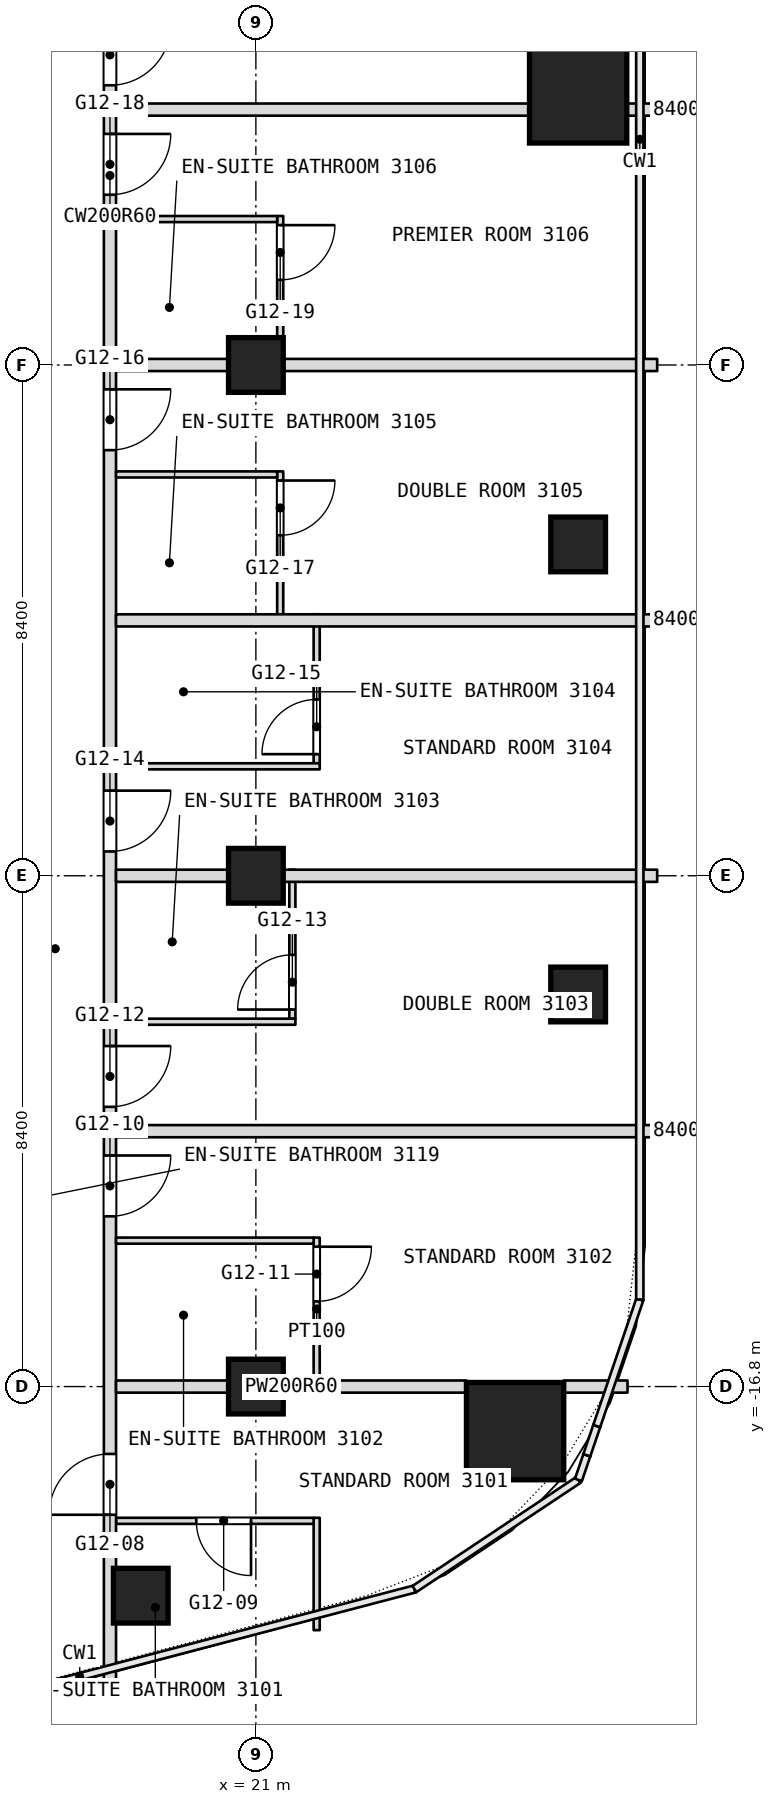
"""IFC4 building model, lengths in metres.
Left out: names, types, materials, properties, quantities, classifications, styles, units other than length and angle.
Written with IfcOpenShell. Run it as: python <this file> out.ifc"""

import sys

from ifc_helpers import new_model, si_unit, direction, frame, frame_2d, origin, origin_2d, place, context, subcontext, project, spatial, rectangle, extrude, element, fill, save


model = new_model("IFC4")
c1 = context("Model", 3, precision=1e-05, world=origin(), true_north=direction((0.0, 1.0)))
c2 = subcontext(c1, "Body", "Model", "MODEL_VIEW")
j1 = project(units=[si_unit("LENGTHUNIT", "METRE"), si_unit("PLANEANGLEUNIT", "RADIAN")], contexts=[c1])
p1 = place(None, origin())
s1 = spatial("IfcSite", under=j1, at=p1, CompositionType="ELEMENT")
p2 = place(p1, origin())
s2 = spatial("IfcBuilding", under=s1, at=p2, CompositionType="ELEMENT")
p3 = place(p2, frame((0.0, 0.0, 137.3)))
s3 = spatial("IfcBuildingStorey", under=s2, at=p3, CompositionType="ELEMENT", Elevation=137.3)
for number, where, z_axis, x_axis in (
    (1, (25.263, -17.533, 0.0), (0.0, 0.0, 1.0), (1.0, 0.0, 0.0)),
    (2, (26.3, 4.45, 0.0), (0.0, 0.0, 1.0), (1.0, 0.0, 0.0)),
):
    element("IfcColumn", number, at=place(p3, frame(where, z_axis=z_axis, x_axis=x_axis)), inside=s3, PredefinedType="COLUMN", context=c2, shape_type="SweptSolid", body=[
        extrude(rectangle(XDim=1.6, YDim=1.6, at=origin_2d()), origin(), (0.0, 0.0, 1.0), 3.6),
    ])
for number, where, z_axis, x_axis in (
    (3, (21.0, -16.8, 0.0), (0.0, 0.0, 1.0), (1.0, 0.0, 0.0)),
    (4, (21.0, -8.4, 0.0), (0.0, 0.0, 1.0), (1.0, 0.0, 0.0)),
    (5, (21.0, 0.0, 0.0), (0.0, 0.0, 1.0), (1.0, 0.0, 0.0)),
    (6, (26.3, -2.951, 0.0), (0.0, 0.0, 1.0), (1.0, 0.0, 0.0)),
    (7, (26.3, -10.352, 0.0), (0.0, 0.0, 1.0), (1.0, 0.0, 0.0)),
    (8, (19.107, -20.239, 0.0), (0.0, 0.0, 1.0), (1.0, 0.0, 0.0)),
):
    element("IfcColumn", number, at=place(p3, frame(where, z_axis=z_axis, x_axis=x_axis)), inside=s3, PredefinedType="COLUMN", context=c2, shape_type="SweptSolid", body=[
        extrude(rectangle(XDim=0.9, YDim=0.9, at=origin_2d()), origin(), (0.0, 0.0, 1.0), 3.6),
    ])
p4 = place(p3, frame((22.0, -20.806, 0.0), z_axis=(0.0, 0.0, 1.0), x_axis=(0.0, 1.0, 0.0)))
e9 = element("IfcWall", 9, at=p4, inside=s3, PredefinedType="PARTITIONING", context=c2, shape_type="SweptSolid", body=[
    extrude(rectangle(XDim=1.848, YDim=0.1, at=frame_2d((0.924, 0.0))), origin(), (0.0, 0.0, 1.0), 3.34),
])
p5 = place(p3, frame((22.0, -16.7, 0.0), z_axis=(0.0, 0.0, 1.0), x_axis=(0.0, 1.0, 0.0)))
e10 = element("IfcWall", 10, at=p5, inside=s3, PredefinedType="PARTITIONING", context=c2, shape_type="SweptSolid", body=[
    extrude(rectangle(XDim=2.35, YDim=0.1, at=frame_2d((1.175, 0.0))), origin(), (0.0, 0.0, 1.0), 3.34),
])
p6 = place(p5, frame((1.3, 0.0, 0.0)))
e11 = element("IfcOpeningElement", 11, at=p6, cuts=e10, PredefinedType="OPENING", context=c2, shape_type="SweptSolid", body=[
    extrude(rectangle(XDim=0.9, YDim=2.1, at=frame_2d((0.45, 1.05))), frame((0.0, 0.05, 0.0), z_axis=(0.0, -1.0, 0.0), x_axis=(1.0, 0.0, 0.0)), (0.0, 0.0, 1.0), 0.1),
])
p7 = place(p3, frame((22.0, -6.55, 0.0), z_axis=(0.0, 0.0, 1.0), x_axis=(0.0, 1.0, 0.0)))
e12 = element("IfcWall", 12, at=p7, inside=s3, PredefinedType="PARTITIONING", context=c2, shape_type="SweptSolid", body=[
    extrude(rectangle(XDim=2.45, YDim=0.1, at=frame_2d((1.225, 0.0))), origin(), (0.0, 0.0, 1.0), 3.34),
])
p8 = place(p7, frame((0.15, 0.0, 0.0)))
e13 = element("IfcOpeningElement", 13, at=p8, cuts=e12, PredefinedType="OPENING", context=c2, shape_type="SweptSolid", body=[
    extrude(rectangle(XDim=0.9, YDim=2.1, at=frame_2d((0.45, 1.05))), frame((0.0, 0.05, 0.0), z_axis=(0.0, -1.0, 0.0), x_axis=(1.0, 0.0, 0.0)), (0.0, 0.0, 1.0), 0.1),
])
p9 = place(p3, frame((21.6, -10.75, 0.0), z_axis=(0.0, 0.0, 1.0), x_axis=(0.0, 1.0, 0.0)))
e14 = element("IfcWall", 14, at=p9, inside=s3, PredefinedType="PARTITIONING", context=c2, shape_type="SweptSolid", body=[
    extrude(rectangle(XDim=2.45, YDim=0.1, at=frame_2d((1.225, 0.0))), origin(), (0.0, 0.0, 1.0), 3.34),
])
p10 = place(p9, frame((0.15, 0.0, 0.0)))
e15 = element("IfcOpeningElement", 15, at=p10, cuts=e14, PredefinedType="OPENING", context=c2, shape_type="SweptSolid", body=[
    extrude(rectangle(XDim=0.9, YDim=2.1, at=frame_2d((0.45, 1.05))), frame((0.0, 0.05, 0.0), z_axis=(0.0, -1.0, 0.0), x_axis=(1.0, 0.0, 0.0)), (0.0, 0.0, 1.0), 0.1),
])
p11 = place(p3, frame((21.4, -4.1, 0.0), z_axis=(0.0, 0.0, 1.0), x_axis=(0.0, 1.0, 0.0)))
e16 = element("IfcWall", 16, at=p11, inside=s3, PredefinedType="PARTITIONING", context=c2, shape_type="SweptSolid", body=[
    extrude(rectangle(XDim=2.35, YDim=0.1, at=frame_2d((1.175, 0.0))), origin(), (0.0, 0.0, 1.0), 3.34),
])
p12 = place(p11, frame((1.3, 0.0, 0.0)))
e17 = element("IfcOpeningElement", 17, at=p12, cuts=e16, PredefinedType="OPENING", context=c2, shape_type="SweptSolid", body=[
    extrude(rectangle(XDim=0.9, YDim=2.1, at=frame_2d((0.45, 1.05))), frame((0.0, 0.05, 0.0), z_axis=(0.0, -1.0, 0.0), x_axis=(1.0, 0.0, 0.0)), (0.0, 0.0, 1.0), 0.1),
])
p13 = place(p3, frame((21.4, 0.1, 0.0), z_axis=(0.0, 0.0, 1.0), x_axis=(0.0, 1.0, 0.0)))
e18 = element("IfcWall", 18, at=p13, inside=s3, PredefinedType="PARTITIONING", context=c2, shape_type="SweptSolid", body=[
    extrude(rectangle(XDim=2.35, YDim=0.1, at=frame_2d((1.175, 0.0))), origin(), (0.0, 0.0, 1.0), 3.34),
])
p14 = place(p13, frame((1.3, 0.0, 0.0)))
e19 = element("IfcOpeningElement", 19, at=p14, cuts=e18, PredefinedType="OPENING", context=c2, shape_type="SweptSolid", body=[
    extrude(rectangle(XDim=0.9, YDim=2.1, at=frame_2d((0.45, 1.05))), frame((0.0, 0.05, 0.0), z_axis=(0.0, -1.0, 0.0), x_axis=(1.0, 0.0, 0.0)), (0.0, 0.0, 1.0), 0.1),
])
p15 = place(p3, frame((18.7, -19.008, 0.0), z_axis=(0.0, 0.0, 1.0), x_axis=(1.0, 0.0, 0.0)))
e20 = element("IfcWall", 20, at=p15, inside=s3, PredefinedType="PARTITIONING", context=c2, shape_type="SweptSolid", body=[
    extrude(rectangle(XDim=3.25, YDim=0.1, at=frame_2d((1.625, 0.0))), origin(), (0.0, 0.0, 1.0), 3.34),
])
p16 = place(p15, frame((1.32, 0.0, 0.0)))
e21 = element("IfcOpeningElement", 21, at=p16, cuts=e20, PredefinedType="OPENING", context=c2, shape_type="SweptSolid", body=[
    extrude(rectangle(XDim=0.9, YDim=2.1, at=frame_2d((0.45, 1.05))), frame((0.0, 0.05, 0.0), z_axis=(0.0, -1.0, 0.0), x_axis=(1.0, 0.0, 0.0)), (0.0, 0.0, 1.0), 0.1),
])
p17 = place(p3, frame((18.6, -21.708, 0.0), z_axis=(0.0, 0.0, 1.0), x_axis=(0.0, 1.0, 0.0)))
e22 = element("IfcWall", 22, at=p17, inside=s3, PredefinedType="PARTITIONING", context=c2, shape_type="SweptSolid", body=[
    extrude(rectangle(XDim=49.648, YDim=0.2, at=frame_2d((24.824, 0.0))), origin(), (0.0, 0.0, 1.0), 3.34),
])
p18 = place(p17, frame((2.8, 0.0, 0.0)))
e23 = element("IfcOpeningElement", 23, at=p18, cuts=e22, PredefinedType="OPENING", context=c2, shape_type="SweptSolid", body=[
    extrude(rectangle(XDim=1.0, YDim=2.1, at=frame_2d((0.5, 1.05))), frame((0.0, 0.1, 0.0), z_axis=(0.0, -1.0, 0.0), x_axis=(1.0, 0.0, 0.0)), (0.0, 0.0, 1.0), 0.2),
])
p19 = place(p17, frame((7.708, 0.0, 0.0)))
e24 = element("IfcOpeningElement", 24, at=p19, cuts=e22, PredefinedType="OPENING", context=c2, shape_type="SweptSolid", body=[
    extrude(rectangle(XDim=1.0, YDim=2.1, at=frame_2d((0.5, 1.05))), frame((0.0, 0.1, 0.0), z_axis=(0.0, -1.0, 0.0), x_axis=(1.0, 0.0, 0.0)), (0.0, 0.0, 1.0), 0.2),
])
p20 = place(p17, frame((9.508, 0.0, 0.0)))
e25 = element("IfcOpeningElement", 25, at=p20, cuts=e22, PredefinedType="OPENING", context=c2, shape_type="SweptSolid", body=[
    extrude(rectangle(XDim=1.0, YDim=2.1, at=frame_2d((0.5, 1.05))), frame((0.0, 0.1, 0.0), z_axis=(0.0, -1.0, 0.0), x_axis=(1.0, 0.0, 0.0)), (0.0, 0.0, 1.0), 0.2),
])
p21 = place(p17, frame((13.708, 0.0, 0.0)))
e26 = element("IfcOpeningElement", 26, at=p21, cuts=e22, PredefinedType="OPENING", context=c2, shape_type="SweptSolid", body=[
    extrude(rectangle(XDim=1.0, YDim=2.1, at=frame_2d((0.5, 1.05))), frame((0.0, 0.1, 0.0), z_axis=(0.0, -1.0, 0.0), x_axis=(1.0, 0.0, 0.0)), (0.0, 0.0, 1.0), 0.2),
])
p22 = place(p17, frame((20.308, 0.0, 0.0)))
e27 = element("IfcOpeningElement", 27, at=p22, cuts=e22, PredefinedType="OPENING", context=c2, shape_type="SweptSolid", body=[
    extrude(rectangle(XDim=1.0, YDim=2.1, at=frame_2d((0.5, 1.05))), frame((0.0, 0.1, 0.0), z_axis=(0.0, -1.0, 0.0), x_axis=(1.0, 0.0, 0.0)), (0.0, 0.0, 1.0), 0.2),
])
p23 = place(p17, frame((24.508, 0.0, 0.0)))
e28 = element("IfcOpeningElement", 28, at=p23, cuts=e22, PredefinedType="OPENING", context=c2, shape_type="SweptSolid", body=[
    extrude(rectangle(XDim=1.0, YDim=2.1, at=frame_2d((0.5, 1.05))), frame((0.0, 0.1, 0.0), z_axis=(0.0, -1.0, 0.0), x_axis=(1.0, 0.0, 0.0)), (0.0, 0.0, 1.0), 0.2),
])
p24 = place(p17, frame((26.308, 0.0, 0.0)))
e29 = element("IfcOpeningElement", 29, at=p24, cuts=e22, PredefinedType="OPENING", context=c2, shape_type="SweptSolid", body=[
    extrude(rectangle(XDim=1.0, YDim=2.1, at=frame_2d((0.5, 1.05))), frame((0.0, 0.1, 0.0), z_axis=(0.0, -1.0, 0.0), x_axis=(1.0, 0.0, 0.0)), (0.0, 0.0, 1.0), 0.2),
])
p25 = place(p17, frame((30.508, 0.0, 0.0)))
e30 = element("IfcOpeningElement", 30, at=p25, cuts=e22, PredefinedType="OPENING", context=c2, shape_type="SweptSolid", body=[
    extrude(rectangle(XDim=1.0, YDim=2.1, at=frame_2d((0.5, 1.05))), frame((0.0, 0.1, 0.0), z_axis=(0.0, -1.0, 0.0), x_axis=(1.0, 0.0, 0.0)), (0.0, 0.0, 1.0), 0.2),
])
p26 = place(p17, frame((37.108, 0.0, 0.0)))
e31 = element("IfcOpeningElement", 31, at=p26, cuts=e22, PredefinedType="OPENING", context=c2, shape_type="SweptSolid", body=[
    extrude(rectangle(XDim=1.0, YDim=2.1, at=frame_2d((0.5, 1.05))), frame((0.0, 0.1, 0.0), z_axis=(0.0, -1.0, 0.0), x_axis=(1.0, 0.0, 0.0)), (0.0, 0.0, 1.0), 0.2),
])
p27 = place(p17, frame((43.558, 0.0, 0.0)))
e32 = element("IfcOpeningElement", 32, at=p27, cuts=e22, PredefinedType="OPENING", context=c2, shape_type="SweptSolid", body=[
    extrude(rectangle(XDim=1.1, YDim=2.1, at=frame_2d((0.55, 1.05))), frame((0.0, 0.1, 0.0), z_axis=(0.0, -1.0, 0.0), x_axis=(1.0, 0.0, 0.0)), (0.0, 0.0, 1.0), 0.2),
])
p28 = place(p3, frame((18.7, -16.8, 0.0), z_axis=(0.0, 0.0, 1.0), x_axis=(1.0, 0.0, 0.0)))
e33 = element("IfcWall", 33, at=p28, inside=s3, PredefinedType="PARTITIONING", context=c2, shape_type="SweptSolid", body=[
    extrude(rectangle(XDim=5.763, YDim=0.2, at=frame_2d((2.881, 0.0))), origin(), (0.0, 0.0, 1.0), 2.89),
])
p29 = place(p3, frame((26.063, -16.8, 0.0), z_axis=(0.0, 0.0, 1.0), x_axis=(1.0, 0.0, 0.0)))
e34 = element("IfcWall", 34, at=p29, inside=s3, PredefinedType="PARTITIONING", context=c2, shape_type="SweptSolid", body=[
    extrude(rectangle(XDim=1.049, YDim=0.2, at=frame_2d((0.524, 0.0))), origin(), (0.0, 0.0, 1.0), 3.34),
])
p30 = place(p3, frame((18.7, -14.4, 0.0), z_axis=(0.0, 0.0, 1.0), x_axis=(1.0, 0.0, 0.0)))
e35 = element("IfcWall", 35, at=p30, inside=s3, PredefinedType="PARTITIONING", context=c2, shape_type="SweptSolid", body=[
    extrude(rectangle(XDim=3.25, YDim=0.1, at=frame_2d((1.625, 0.0))), origin(), (0.0, 0.0, 1.0), 3.34),
])
p31 = place(p3, frame((18.7, -12.6, 0.0), z_axis=(0.0, 0.0, 1.0), x_axis=(1.0, 0.0, 0.0)))
e36 = element("IfcWall", 36, at=p31, inside=s3, PredefinedType="PARTITIONING", context=c2, shape_type="SweptSolid", body=[
    extrude(rectangle(XDim=8.9, YDim=0.2, at=frame_2d((4.45, 0.0))), origin(), (0.0, 0.0, 1.0), 3.34),
])
p32 = place(p3, frame((18.7, -10.8, 0.0), z_axis=(0.0, 0.0, 1.0), x_axis=(1.0, 0.0, 0.0)))
e37 = element("IfcWall", 37, at=p32, inside=s3, PredefinedType="PARTITIONING", context=c2, shape_type="SweptSolid", body=[
    extrude(rectangle(XDim=2.95, YDim=0.1, at=frame_2d((1.475, 0.0))), origin(), (0.0, 0.0, 1.0), 3.34),
])
p33 = place(p3, frame((18.7, -8.4, 0.0), z_axis=(0.0, 0.0, 1.0), x_axis=(1.0, 0.0, 0.0)))
e38 = element("IfcWall", 38, at=p33, inside=s3, PredefinedType="PARTITIONING", context=c2, shape_type="SweptSolid", body=[
    extrude(rectangle(XDim=8.9, YDim=0.2, at=frame_2d((4.45, 0.0))), origin(), (0.0, 0.0, 1.0), 2.89),
])
p34 = place(p3, frame((18.7, -6.6, 0.0), z_axis=(0.0, 0.0, 1.0), x_axis=(1.0, 0.0, 0.0)))
e39 = element("IfcWall", 39, at=p34, inside=s3, PredefinedType="PARTITIONING", context=c2, shape_type="SweptSolid", body=[
    extrude(rectangle(XDim=3.35, YDim=0.1, at=frame_2d((1.675, 0.0))), origin(), (0.0, 0.0, 1.0), 3.34),
])
p35 = place(p3, frame((18.7, -4.2, 0.0), z_axis=(0.0, 0.0, 1.0), x_axis=(1.0, 0.0, 0.0)))
e40 = element("IfcWall", 40, at=p35, inside=s3, PredefinedType="PARTITIONING", context=c2, shape_type="SweptSolid", body=[
    extrude(rectangle(XDim=8.9, YDim=0.2, at=frame_2d((4.45, 0.0))), origin(), (0.0, 0.0, 1.0), 3.34),
])
p36 = place(p3, frame((18.7, -1.8, 0.0), z_axis=(0.0, 0.0, 1.0), x_axis=(1.0, 0.0, 0.0)))
e41 = element("IfcWall", 41, at=p36, inside=s3, PredefinedType="PARTITIONING", context=c2, shape_type="SweptSolid", body=[
    extrude(rectangle(XDim=2.65, YDim=0.1, at=frame_2d((1.325, 0.0))), origin(), (0.0, 0.0, 1.0), 3.34),
])
p37 = place(p3, frame((18.7, 0.0, 0.0), z_axis=(0.0, 0.0, 1.0), x_axis=(1.0, 0.0, 0.0)))
e42 = element("IfcWall", 42, at=p37, inside=s3, PredefinedType="PARTITIONING", context=c2, shape_type="SweptSolid", body=[
    extrude(rectangle(XDim=8.9, YDim=0.2, at=frame_2d((4.45, 0.0))), origin(), (0.0, 0.0, 1.0), 2.89),
])
p38 = place(p3, frame((18.7, 2.4, 0.0), z_axis=(0.0, 0.0, 1.0), x_axis=(1.0, 0.0, 0.0)))
e43 = element("IfcWall", 43, at=p38, inside=s3, PredefinedType="PARTITIONING", context=c2, shape_type="SweptSolid", body=[
    extrude(rectangle(XDim=2.65, YDim=0.1, at=frame_2d((1.325, 0.0))), origin(), (0.0, 0.0, 1.0), 3.34),
])
p39 = place(p3, frame((18.7, 4.2, 0.0), z_axis=(0.0, 0.0, 1.0), x_axis=(1.0, 0.0, 0.0)))
e44 = element("IfcWall", 44, at=p39, inside=s3, PredefinedType="PARTITIONING", context=c2, shape_type="SweptSolid", body=[
    extrude(rectangle(XDim=6.8, YDim=0.2, at=frame_2d((3.4, 0.0))), origin(), (0.0, 0.0, 1.0), 3.34),
])
p40 = place(p3, frame((27.1, 4.2, 0.0), z_axis=(0.0, 0.0, 1.0), x_axis=(1.0, 0.0, 0.0)))
e45 = element("IfcWall", 45, at=p40, inside=s3, PredefinedType="PARTITIONING", context=c2, shape_type="SweptSolid", body=[
    extrude(rectangle(XDim=0.5, YDim=0.2, at=frame_2d((0.25, 0.0))), origin(), (0.0, 0.0, 1.0), 3.34),
])
p41 = place(p6, origin())
e46 = element("IfcDoor", 46, at=p41, inside=s3, OperationType="SINGLE_SWING_RIGHT", PredefinedType="DOOR", context=c2, shape_type="SweptSolid", body=[
    extrude(rectangle(XDim=0.9, YDim=2.1, at=frame_2d((0.45, 1.05))), frame((0.0, 0.025, 0.0), z_axis=(0.0, -1.0, 0.0), x_axis=(1.0, 0.0, 0.0)), (0.0, 0.0, 1.0), 0.05),
])
fill(e11, e46)
p42 = place(p8, origin())
e47 = element("IfcDoor", 47, at=p42, inside=s3, OperationType="SINGLE_SWING_LEFT", PredefinedType="DOOR", context=c2, shape_type="SweptSolid", body=[
    extrude(rectangle(XDim=0.9, YDim=2.1, at=frame_2d((0.45, 1.05))), frame((0.0, 0.025, 0.0), z_axis=(0.0, -1.0, 0.0), x_axis=(1.0, 0.0, 0.0)), (0.0, 0.0, 1.0), 0.05),
])
fill(e13, e47)
p43 = place(p10, origin())
e48 = element("IfcDoor", 48, at=p43, inside=s3, OperationType="SINGLE_SWING_LEFT", PredefinedType="DOOR", context=c2, shape_type="SweptSolid", body=[
    extrude(rectangle(XDim=0.9, YDim=2.1, at=frame_2d((0.45, 1.05))), frame((0.0, 0.025, 0.0), z_axis=(0.0, -1.0, 0.0), x_axis=(1.0, 0.0, 0.0)), (0.0, 0.0, 1.0), 0.05),
])
fill(e15, e48)
p44 = place(p12, origin())
e49 = element("IfcDoor", 49, at=p44, inside=s3, OperationType="SINGLE_SWING_RIGHT", PredefinedType="DOOR", context=c2, shape_type="SweptSolid", body=[
    extrude(rectangle(XDim=0.9, YDim=2.1, at=frame_2d((0.45, 1.05))), frame((0.0, 0.025, 0.0), z_axis=(0.0, -1.0, 0.0), x_axis=(1.0, 0.0, 0.0)), (0.0, 0.0, 1.0), 0.05),
])
fill(e17, e49)
p45 = place(p14, origin())
e50 = element("IfcDoor", 50, at=p45, inside=s3, OperationType="SINGLE_SWING_RIGHT", PredefinedType="DOOR", context=c2, shape_type="SweptSolid", body=[
    extrude(rectangle(XDim=0.9, YDim=2.1, at=frame_2d((0.45, 1.05))), frame((0.0, 0.025, 0.0), z_axis=(0.0, -1.0, 0.0), x_axis=(1.0, 0.0, 0.0)), (0.0, 0.0, 1.0), 0.05),
])
fill(e19, e50)
p46 = place(p16, origin())
e51 = element("IfcDoor", 51, at=p46, inside=s3, OperationType="SINGLE_SWING_RIGHT", PredefinedType="DOOR", context=c2, shape_type="SweptSolid", body=[
    extrude(rectangle(XDim=0.9, YDim=2.1, at=frame_2d((0.45, 1.05))), frame((0.0, 0.025, 0.0), z_axis=(0.0, -1.0, 0.0), x_axis=(1.0, 0.0, 0.0)), (0.0, 0.0, 1.0), 0.05),
])
fill(e21, e51)
p47 = place(p18, origin())
e52 = element("IfcDoor", 52, at=p47, inside=s3, OperationType="SINGLE_SWING_RIGHT", PredefinedType="DOOR", context=c2, shape_type="SweptSolid", body=[
    extrude(rectangle(XDim=1.0, YDim=2.1, at=frame_2d((0.5, 1.05))), frame((0.0, 0.025, 0.0), z_axis=(0.0, -1.0, 0.0), x_axis=(1.0, 0.0, 0.0)), (0.0, 0.0, 1.0), 0.05),
])
fill(e23, e52)
p48 = place(p19, origin())
e53 = element("IfcDoor", 53, at=p48, inside=s3, OperationType="SINGLE_SWING_RIGHT", PredefinedType="DOOR", context=c2, shape_type="SweptSolid", body=[
    extrude(rectangle(XDim=1.0, YDim=2.1, at=frame_2d((0.5, 1.05))), frame((0.0, 0.025, 0.0), z_axis=(0.0, -1.0, 0.0), x_axis=(1.0, 0.0, 0.0)), (0.0, 0.0, 1.0), 0.05),
])
fill(e24, e53)
p49 = place(p20, origin())
e54 = element("IfcDoor", 54, at=p49, inside=s3, OperationType="SINGLE_SWING_RIGHT", PredefinedType="DOOR", context=c2, shape_type="SweptSolid", body=[
    extrude(rectangle(XDim=1.0, YDim=2.1, at=frame_2d((0.5, 1.05))), frame((0.0, 0.025, 0.0), z_axis=(0.0, -1.0, 0.0), x_axis=(1.0, 0.0, 0.0)), (0.0, 0.0, 1.0), 0.05),
])
fill(e25, e54)
p50 = place(p21, origin())
e55 = element("IfcDoor", 55, at=p50, inside=s3, OperationType="SINGLE_SWING_RIGHT", PredefinedType="DOOR", context=c2, shape_type="SweptSolid", body=[
    extrude(rectangle(XDim=1.0, YDim=2.1, at=frame_2d((0.5, 1.05))), frame((0.0, 0.025, 0.0), z_axis=(0.0, -1.0, 0.0), x_axis=(1.0, 0.0, 0.0)), (0.0, 0.0, 1.0), 0.05),
])
fill(e26, e55)
p51 = place(p22, origin())
e56 = element("IfcDoor", 56, at=p51, inside=s3, OperationType="SINGLE_SWING_RIGHT", PredefinedType="DOOR", context=c2, shape_type="SweptSolid", body=[
    extrude(rectangle(XDim=1.0, YDim=2.1, at=frame_2d((0.5, 1.05))), frame((0.0, 0.025, 0.0), z_axis=(0.0, -1.0, 0.0), x_axis=(1.0, 0.0, 0.0)), (0.0, 0.0, 1.0), 0.05),
])
fill(e27, e56)
p52 = place(p23, origin())
e57 = element("IfcDoor", 57, at=p52, inside=s3, OperationType="SINGLE_SWING_RIGHT", PredefinedType="DOOR", context=c2, shape_type="SweptSolid", body=[
    extrude(rectangle(XDim=1.0, YDim=2.1, at=frame_2d((0.5, 1.05))), frame((0.0, 0.025, 0.0), z_axis=(0.0, -1.0, 0.0), x_axis=(1.0, 0.0, 0.0)), (0.0, 0.0, 1.0), 0.05),
])
fill(e28, e57)
p53 = place(p24, origin())
e58 = element("IfcDoor", 58, at=p53, inside=s3, OperationType="SINGLE_SWING_RIGHT", PredefinedType="DOOR", context=c2, shape_type="SweptSolid", body=[
    extrude(rectangle(XDim=1.0, YDim=2.1, at=frame_2d((0.5, 1.05))), frame((0.0, 0.025, 0.0), z_axis=(0.0, -1.0, 0.0), x_axis=(1.0, 0.0, 0.0)), (0.0, 0.0, 1.0), 0.05),
])
fill(e29, e58)
save(model, sys.argv[1])
